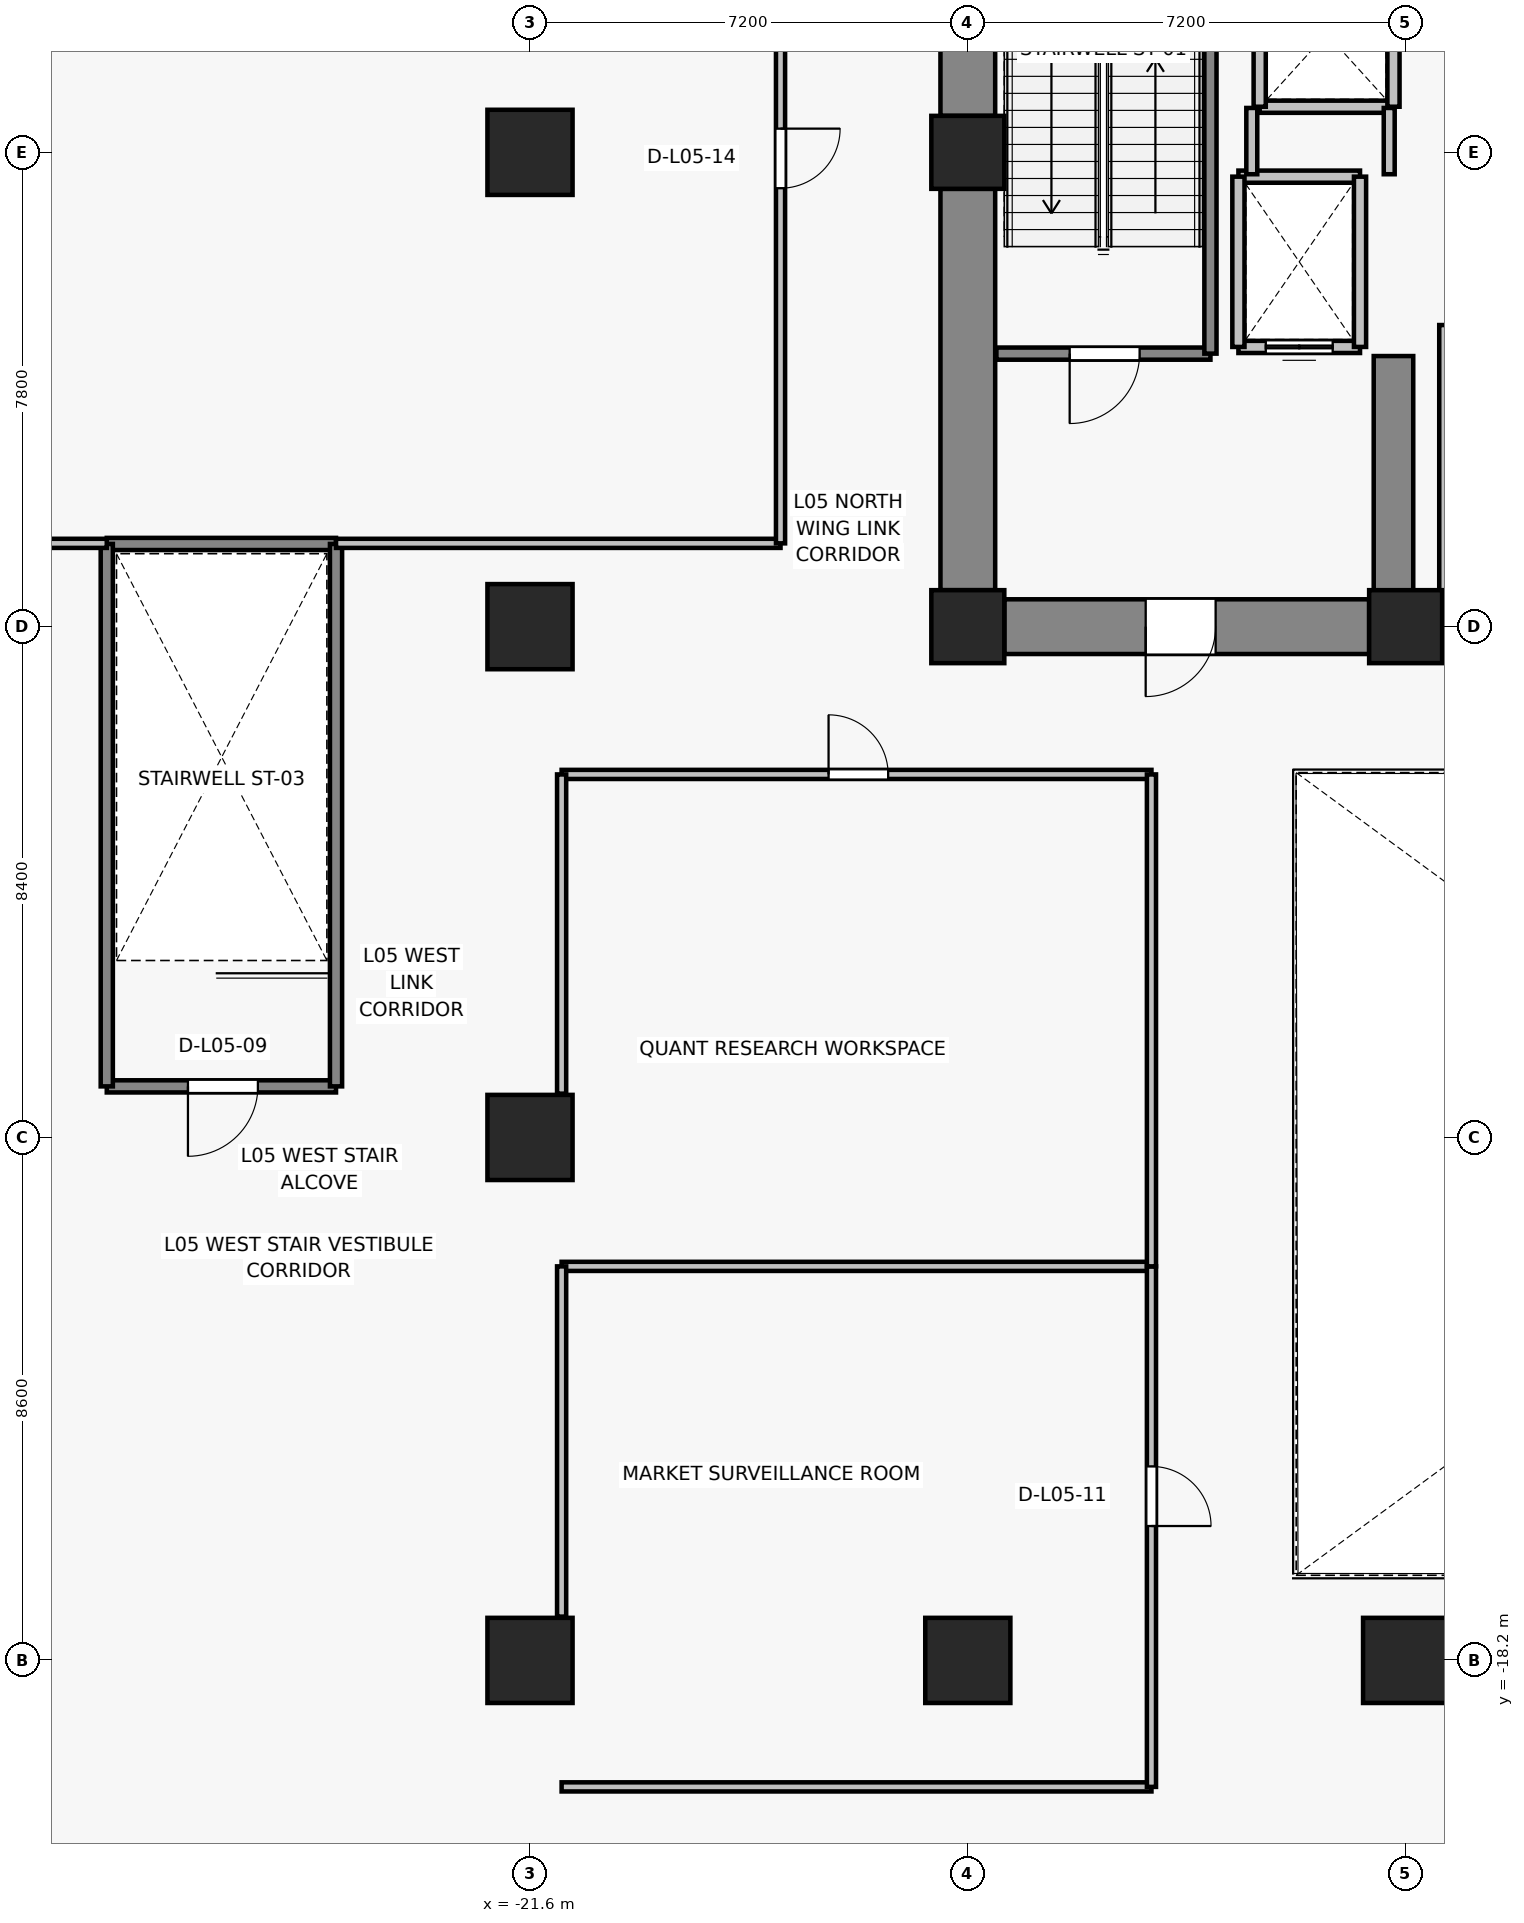
"""IFC4 building model, lengths in metres.
Left out: names, types, materials, properties, quantities, classifications, styles, units other than length and angle.
Written with IfcOpenShell. Run it as: python <this file> out.ifc"""

import sys

from ifc_helpers import new_model, si_unit, direction, frame, frame_2d, origin, origin_2d, place, context, subcontext, project, spatial, rectangle, extrude, source, transform, mapped, element, fill, save


model = new_model("IFC4")
c1 = context("Model", 3, precision=1e-05, world=origin(), true_north=direction((0.0, 1.0)))
c2 = subcontext(c1, "Body", "Model", "MODEL_VIEW")
j1 = project(units=[si_unit("LENGTHUNIT", "METRE"), si_unit("PLANEANGLEUNIT", "RADIAN")], contexts=[c1])
p1 = place(None, origin())
s1 = spatial("IfcSite", under=j1, at=p1, CompositionType="ELEMENT")
p2 = place(p1, origin())
s2 = spatial("IfcBuilding", under=s1, at=p2, CompositionType="ELEMENT")
p3 = place(p2, frame((0.0, 0.0, 22.6)))
s3 = spatial("IfcBuildingStorey", under=s2, at=p3, CompositionType="ELEMENT", Elevation=22.6)
for number, where, z_axis, x_axis in (
    (1, (-14.4, -1.2, 0.0), (0.0, 0.0, 1.0), (1.0, 0.0, 0.0)),
    (2, (-7.2, -1.2, 0.0), (0.0, 0.0, 1.0), (1.0, 0.0, 0.0)),
    (3, (-14.4, 6.6, 0.0), (0.0, 0.0, 1.0), (1.0, 0.0, 0.0)),
):
    element("IfcColumn", number, at=place(p3, frame(where, z_axis=z_axis, x_axis=x_axis)), inside=s3, PredefinedType="COLUMN", context=c2, shape_type="SweptSolid", body=[
        extrude(rectangle(XDim=1.2, YDim=1.2, at=origin_2d()), origin(), (0.0, 0.0, 1.0), 4.8),
    ])
for number, where, z_axis, x_axis in (
    (4, (-21.6, -18.2, 0.0), (0.0, 0.0, 1.0), (1.0, 0.0, 0.0)),
    (5, (-14.4, -18.2, 0.0), (0.0, 0.0, 1.0), (1.0, 0.0, 0.0)),
    (6, (-7.2, -18.2, 0.0), (0.0, 0.0, 1.0), (1.0, 0.0, 0.0)),
    (7, (-21.6, -9.6, 0.0), (0.0, 0.0, 1.0), (1.0, 0.0, 0.0)),
    (8, (-21.6, -1.2, 0.0), (0.0, 0.0, 1.0), (1.0, 0.0, 0.0)),
    (9, (-21.6, 6.6, 0.0), (0.0, 0.0, 1.0), (1.0, 0.0, 0.0)),
):
    element("IfcColumn", number, at=place(p3, frame(where, z_axis=z_axis, x_axis=x_axis)), inside=s3, PredefinedType="COLUMN", context=c2, shape_type="SweptSolid", body=[
        extrude(rectangle(XDim=1.4, YDim=1.4, at=origin_2d()), origin(), (0.0, 0.0, 1.0), 4.8),
    ])
p4 = place(p3, frame((-14.4, -0.6, 0.0), z_axis=(0.0, 0.0, 1.0), x_axis=(0.0, 1.0, 0.0)))
e10 = element("IfcWall", 10, at=p4, inside=s3, PredefinedType="SHEAR", context=c2, shape_type="SweptSolid", body=[
    extrude(rectangle(XDim=6.6, YDim=0.9, at=frame_2d((3.3, 0.0))), origin(), (0.0, 0.0, 1.0), 4.55),
])
p5 = place(p3, frame((-14.4, 7.2, 0.0), z_axis=(0.0, 0.0, 1.0), x_axis=(0.0, 1.0, 0.0)))
e11 = element("IfcWall", 11, at=p5, inside=s3, PredefinedType="SHEAR", context=c2, shape_type="SweptSolid", body=[
    extrude(rectangle(XDim=5.7, YDim=0.9, at=frame_2d((2.85, 0.0))), origin(), (0.0, 0.0, 1.0), 4.55),
])
p6 = place(p3, frame((-7.8, -1.2, 0.0), z_axis=(0.0, 0.0, 1.0), x_axis=(-1.0, 0.0, 0.0)))
e12 = element("IfcWall", 12, at=p6, inside=s3, PredefinedType="SHEAR", context=c2, shape_type="SweptSolid", body=[
    extrude(rectangle(XDim=6.0, YDim=0.9, at=frame_2d((3.0, 0.0))), origin(), (0.0, 0.0, 1.0), 4.55),
])
p7 = place(p6, frame((2.525, 0.0, 0.0)))
e13 = element("IfcOpeningElement", 13, at=p7, cuts=e12, PredefinedType="OPENING", context=c2, shape_type="SweptSolid", body=[
    extrude(rectangle(XDim=1.15, YDim=2.15, at=frame_2d((0.575, 1.075))), frame((0.0, 0.46, 0.0), z_axis=(0.0, -1.0, 0.0), x_axis=(1.0, 0.0, 0.0)), (0.0, 0.0, 1.0), 0.92),
])
p8 = place(p3, frame((-7.4, -0.75, 0.0), z_axis=(0.0, 0.0, 1.0), x_axis=(0.0, 1.0, 0.0)))
e14 = element("IfcWall", 14, at=p8, inside=s3, PredefinedType="SHEAR", context=c2, shape_type="SweptSolid", body=[
    extrude(rectangle(XDim=4.0, YDim=0.65, at=frame_2d((2.0, 0.0))), origin(), (0.0, 0.0, 1.0), 4.55),
])
p9 = place(p3, frame((-7.95, 3.4, 0.0), z_axis=(0.0, 0.0, 1.0), x_axis=(-1.0, 0.0, 0.0)))
e15 = element("IfcWall", 15, at=p9, inside=s3, PredefinedType="SOLIDWALL", context=c2, shape_type="SweptSolid", body=[
    extrude(rectangle(XDim=2.0, YDim=0.2, at=frame_2d((1.0, 0.0))), origin(), (0.0, 0.0, 1.0), 4.55),
])
p10 = place(p9, frame((0.45, 0.0, 0.0)))
e16 = element("IfcOpeningElement", 16, at=p10, cuts=e15, PredefinedType="OPENING", context=c2, shape_type="SweptSolid", body=[
    extrude(rectangle(XDim=1.1, YDim=2.2, at=frame_2d((0.55, 1.1))), frame((0.0, 0.11, 0.0), z_axis=(0.0, -1.0, 0.0), x_axis=(1.0, 0.0, 0.0)), (0.0, 0.0, 1.0), 0.22),
])
p11 = place(p3, frame((-9.95, 6.2, 0.0), z_axis=(0.0, 0.0, 1.0), x_axis=(1.0, 0.0, 0.0)))
e17 = element("IfcWall", 17, at=p11, inside=s3, PredefinedType="SOLIDWALL", context=c2, shape_type="SweptSolid", body=[
    extrude(rectangle(XDim=2.0, YDim=0.2, at=frame_2d((1.0, 0.0))), origin(), (0.0, 0.0, 1.0), 4.55),
])
for number, where, z_axis, x_axis in (
    (18, (-9.95, 3.4, 0.0), (0.0, 0.0, 1.0), (0.0, 1.0, 0.0)),
    (19, (-7.95, 6.2, 0.0), (0.0, 0.0, 1.0), (0.0, -1.0, 0.0)),
):
    element("IfcWall", number, at=place(p3, frame(where, z_axis=z_axis, x_axis=x_axis)), inside=s3, PredefinedType="SOLIDWALL", context=c2, shape_type="SweptSolid", body=[
        extrude(rectangle(XDim=2.8, YDim=0.2, at=frame_2d((1.4, 0.0))), origin(), (0.0, 0.0, 1.0), 4.55),
    ])
p12 = place(p3, frame((-7.4, 7.35, 0.0), z_axis=(0.0, 0.0, 1.0), x_axis=(-1.0, 0.0, 0.0)))
e20 = element("IfcWall", 20, at=p12, inside=s3, PredefinedType="SOLIDWALL", context=c2, shape_type="SweptSolid", body=[
    extrude(rectangle(XDim=2.2, YDim=0.2, at=frame_2d((1.1, 0.0))), origin(), (0.0, 0.0, 1.0), 3.09),
])
p13 = place(p3, frame((-9.6, 7.35, 0.0), z_axis=(0.0, 0.0, 1.0), x_axis=(0.0, 1.0, 0.0)))
e21 = element("IfcWall", 21, at=p13, inside=s3, PredefinedType="SOLIDWALL", context=c2, shape_type="SweptSolid", body=[
    extrude(rectangle(XDim=2.4, YDim=0.2, at=frame_2d((1.2, 0.0))), origin(), (0.0, 0.0, 1.0), 4.55),
])
p14 = place(p3, frame((-7.4, 9.75, 0.0), z_axis=(0.0, 0.0, 1.0), x_axis=(0.0, -1.0, 0.0)))
e22 = element("IfcWall", 22, at=p14, inside=s3, PredefinedType="SOLIDWALL", context=c2, shape_type="SweptSolid", body=[
    extrude(rectangle(XDim=2.4, YDim=0.2, at=frame_2d((1.2, 0.0))), origin(), (0.0, 0.0, 1.0), 3.09),
])
p15 = place(p3, frame((-10.41, 3.29, 0.0), z_axis=(0.0, 0.0, 1.0), x_axis=(-1.0, 0.0, 0.0)))
e23 = element("IfcWall", 23, at=p15, inside=s3, PredefinedType="SOLIDWALL", context=c2, shape_type="SweptSolid", body=[
    extrude(rectangle(XDim=3.52, YDim=0.2, at=frame_2d((1.76, 0.0))), origin(), (0.0, 0.0, 1.0), 4.55),
])
p16 = place(p15, frame((1.165, 0.0, 0.0)))
e24 = element("IfcOpeningElement", 24, at=p16, cuts=e23, PredefinedType="OPENING", context=c2, shape_type="SweptSolid", body=[
    extrude(rectangle(XDim=1.15, YDim=2.15, at=frame_2d((0.575, 1.075))), frame((0.0, 0.11, 0.0), z_axis=(0.0, -1.0, 0.0), x_axis=(1.0, 0.0, 0.0)), (0.0, 0.0, 1.0), 0.22),
])
p17 = place(p3, frame((-10.41, 12.13, 0.0), z_axis=(0.0, 0.0, 1.0), x_axis=(0.0, -1.0, 0.0)))
e25 = element("IfcWall", 25, at=p17, inside=s3, PredefinedType="SOLIDWALL", context=c2, shape_type="SweptSolid", body=[
    extrude(rectangle(XDim=8.84, YDim=0.2, at=frame_2d((4.42, 0.0))), origin(), (0.0, 0.0, 1.0), 4.55),
])
p18 = place(p3, frame((-9.73, 6.24, 0.0), z_axis=(0.0, 0.0, 1.0), x_axis=(0.0, 1.0, 0.0)))
e26 = element("IfcWall", 26, at=p18, inside=s3, PredefinedType="PARTITIONING", context=c2, shape_type="SweptSolid", body=[
    extrude(rectangle(XDim=1.09, YDim=0.18, at=frame_2d((0.545, 0.0))), origin(), (0.0, 0.0, 1.0), 4.55),
])
p19 = place(p3, frame((-7.47, 7.33, 0.0), z_axis=(0.0, 0.0, 1.0), x_axis=(0.0, -1.0, 0.0)))
e27 = element("IfcWall", 27, at=p19, inside=s3, PredefinedType="PARTITIONING", context=c2, shape_type="SweptSolid", body=[
    extrude(rectangle(XDim=1.09, YDim=0.18, at=frame_2d((0.545, 0.0))), origin(), (0.0, 0.0, 1.0), 3.09),
])
p20 = place(p3, frame((-1.47, -0.73, 0.0), z_axis=(0.0, 0.0, 1.0), x_axis=(-1.0, 0.0, 0.0)))
e28 = element("IfcWall", 28, at=p20, inside=s3, PredefinedType="PARTITIONING", context=c2, shape_type="SweptSolid", body=[
    extrude(rectangle(XDim=5.11, YDim=0.135, at=frame_2d((2.555, 0.0))), origin(), (0.0, 0.0, 1.0), 4.55),
])
p21 = place(p3, frame((-6.58, -0.73, 0.0), z_axis=(0.0, 0.0, 1.0), x_axis=(0.0, 1.0, 0.0)))
e29 = element("IfcWall", 29, at=p21, inside=s3, PredefinedType="PARTITIONING", context=c2, shape_type="SweptSolid", body=[
    extrude(rectangle(XDim=4.49, YDim=0.135, at=frame_2d((2.245, 0.0))), origin(), (0.0, 0.0, 1.0), 4.55),
])
p22 = place(p3, frame((-24.79, -8.76, 0.0), z_axis=(0.0, 0.0, 1.0), x_axis=(-1.0, 0.0, 0.0)))
e30 = element("IfcWall", 30, at=p22, inside=s3, PredefinedType="SOLIDWALL", context=c2, shape_type="SweptSolid", body=[
    extrude(rectangle(XDim=3.77, YDim=0.2, at=frame_2d((1.885, 0.0))), origin(), (0.0, 0.0, 1.0), 4.55),
])
p23 = place(p22, frame((1.285, 0.0, 0.0)))
e31 = element("IfcOpeningElement", 31, at=p23, cuts=e30, PredefinedType="OPENING", context=c2, shape_type="SweptSolid", body=[
    extrude(rectangle(XDim=1.15, YDim=2.15, at=frame_2d((0.575, 1.075))), frame((0.0, 0.11, 0.0), z_axis=(0.0, -1.0, 0.0), x_axis=(1.0, 0.0, 0.0)), (0.0, 0.0, 1.0), 0.22),
])
p24 = place(p3, frame((-28.56, 0.16, 0.0), z_axis=(0.0, 0.0, 1.0), x_axis=(1.0, 0.0, 0.0)))
e32 = element("IfcWall", 32, at=p24, inside=s3, PredefinedType="SOLIDWALL", context=c2, shape_type="SweptSolid", body=[
    extrude(rectangle(XDim=3.77, YDim=0.2, at=frame_2d((1.885, 0.0))), origin(), (0.0, 0.0, 1.0), 4.55),
])
for number, where, z_axis, x_axis in (
    (33, (-28.56, -8.76, 0.0), (0.0, 0.0, 1.0), (0.0, 1.0, 0.0)),
    (34, (-24.79, 0.16, 0.0), (0.0, 0.0, 1.0), (0.0, -1.0, 0.0)),
):
    element("IfcWall", number, at=place(p3, frame(where, z_axis=z_axis, x_axis=x_axis)), inside=s3, PredefinedType="SOLIDWALL", context=c2, shape_type="SweptSolid", body=[
        extrude(rectangle(XDim=8.92, YDim=0.2, at=frame_2d((4.46, 0.0))), origin(), (0.0, 0.0, 1.0), 3.09),
    ])
p25 = place(p3, frame((-11.38, -20.28, 0.0), z_axis=(0.0, 0.0, 1.0), x_axis=(-1.0, 0.0, 0.0)))
e35 = element("IfcWall", 35, at=p25, inside=s3, PredefinedType="PARTITIONING", context=c2, shape_type="SweptSolid", body=[
    extrude(rectangle(XDim=9.7, YDim=0.15, at=frame_2d((4.85, 0.0))), origin(), (0.0, 0.0, 1.0), 4.09),
])
p26 = place(p3, frame((-21.08, -11.72, 0.0), z_axis=(0.0, 0.0, 1.0), x_axis=(1.0, 0.0, 0.0)))
e36 = element("IfcWall", 36, at=p26, inside=s3, PredefinedType="PARTITIONING", context=c2, shape_type="SweptSolid", body=[
    extrude(rectangle(XDim=9.7, YDim=0.15, at=frame_2d((4.85, 0.0))), origin(), (0.0, 0.0, 1.0), 3.09),
])
p27 = place(p3, frame((-21.08, -17.48, 0.0), z_axis=(0.0, 0.0, 1.0), x_axis=(0.0, 1.0, 0.0)))
e37 = element("IfcWall", 37, at=p27, inside=s3, PredefinedType="PARTITIONING", context=c2, shape_type="SweptSolid", body=[
    extrude(rectangle(XDim=5.76, YDim=0.15, at=frame_2d((2.88, 0.0))), origin(), (0.0, 0.0, 1.0), 3.94),
])
p28 = place(p3, frame((-11.38, -11.72, 0.0), z_axis=(0.0, 0.0, 1.0), x_axis=(0.0, -1.0, 0.0)))
e38 = element("IfcWall", 38, at=p28, inside=s3, PredefinedType="PARTITIONING", context=c2, shape_type="SweptSolid", body=[
    extrude(rectangle(XDim=8.56, YDim=0.15, at=frame_2d((4.28, 0.0))), origin(), (0.0, 0.0, 1.0), 3.19),
])
p29 = place(p28, frame((3.29, 0.0, 0.0)))
e39 = element("IfcOpeningElement", 39, at=p29, cuts=e38, PredefinedType="OPENING", context=c2, shape_type="SweptSolid", body=[
    extrude(rectangle(XDim=0.98, YDim=2.15, at=frame_2d((0.49, 1.075))), frame((0.0, 0.085, 0.0), z_axis=(0.0, -1.0, 0.0), x_axis=(1.0, 0.0, 0.0)), (0.0, 0.0, 1.0), 0.17),
])
p30 = place(p3, frame((-21.08, -3.63, 0.0), z_axis=(0.0, 0.0, 1.0), x_axis=(1.0, 0.0, 0.0)))
e40 = element("IfcWall", 40, at=p30, inside=s3, PredefinedType="PARTITIONING", context=c2, shape_type="SweptSolid", body=[
    extrude(rectangle(XDim=9.7, YDim=0.15, at=frame_2d((4.85, 0.0))), origin(), (0.0, 0.0, 1.0), 3.09),
])
p31 = place(p30, frame((4.39, 0.0, 0.0)))
e41 = element("IfcOpeningElement", 41, at=p31, cuts=e40, PredefinedType="OPENING", context=c2, shape_type="SweptSolid", body=[
    extrude(rectangle(XDim=0.98, YDim=2.15, at=frame_2d((0.49, 1.075))), frame((0.0, 0.085, 0.0), z_axis=(0.0, -1.0, 0.0), x_axis=(1.0, 0.0, 0.0)), (0.0, 0.0, 1.0), 0.17),
])
p32 = place(p3, frame((-21.08, -8.88, 0.0), z_axis=(0.0, 0.0, 1.0), x_axis=(0.0, 1.0, 0.0)))
e42 = element("IfcWall", 42, at=p32, inside=s3, PredefinedType="PARTITIONING", context=c2, shape_type="SweptSolid", body=[
    extrude(rectangle(XDim=5.25, YDim=0.15, at=frame_2d((2.625, 0.0))), origin(), (0.0, 0.0, 1.0), 4.04),
])
p33 = place(p3, frame((-11.38, -3.63, 0.0), z_axis=(0.0, 0.0, 1.0), x_axis=(0.0, -1.0, 0.0)))
e43 = element("IfcWall", 43, at=p33, inside=s3, PredefinedType="PARTITIONING", context=c2, shape_type="SweptSolid", body=[
    extrude(rectangle(XDim=8.09, YDim=0.15, at=frame_2d((4.045, 0.0))), origin(), (0.0, 0.0, 1.0), 3.19),
])
p34 = place(p3, frame((-28.56, 0.17, 0.0), z_axis=(0.0, 0.0, 1.0), x_axis=(-1.0, 0.0, 0.0)))
e44 = element("IfcWall", 44, at=p34, inside=s3, PredefinedType="PARTITIONING", context=c2, shape_type="SweptSolid", body=[
    extrude(rectangle(XDim=5.32, YDim=0.15, at=frame_2d((2.66, 0.0))), origin(), (0.0, 0.0, 1.0), 3.09),
])
p35 = place(p3, frame((-17.48, 0.17, 0.0), z_axis=(0.0, 0.0, 1.0), x_axis=(-1.0, 0.0, 0.0)))
e45 = element("IfcWall", 45, at=p35, inside=s3, PredefinedType="PARTITIONING", context=c2, shape_type="SweptSolid", body=[
    extrude(rectangle(XDim=7.31, YDim=0.15, at=frame_2d((3.655, 0.0))), origin(), (0.0, 0.0, 1.0), 3.94),
])
p36 = place(p3, frame((-17.48, 13.48, 0.0), z_axis=(0.0, 0.0, 1.0), x_axis=(0.0, -1.0, 0.0)))
e46 = element("IfcWall", 46, at=p36, inside=s3, PredefinedType="PARTITIONING", context=c2, shape_type="SweptSolid", body=[
    extrude(rectangle(XDim=13.31, YDim=0.15, at=frame_2d((6.655, 0.0))), origin(), (0.0, 0.0, 1.0), 3.532),
])
p37 = place(p36, frame((6.49, 0.0, 0.0)))
e47 = element("IfcOpeningElement", 47, at=p37, cuts=e46, PredefinedType="OPENING", context=c2, shape_type="SweptSolid", body=[
    extrude(rectangle(XDim=0.98, YDim=2.15, at=frame_2d((0.49, 1.075))), frame((0.0, 0.085, 0.0), z_axis=(0.0, -1.0, 0.0), x_axis=(1.0, 0.0, 0.0)), (0.0, 0.0, 1.0), 0.17),
])
m1 = source(origin(), c2, "Body", "SweptSolid", [
    extrude(rectangle(XDim=1.1, YDim=2.2, at=frame_2d((0.55, 1.1))), frame((0.0, 0.025, 0.0), z_axis=(0.0, -1.0, 0.0), x_axis=(1.0, 0.0, 0.0)), (0.0, 0.0, 1.0), 0.05),
])
p38 = place(p10, origin())
e48 = element("IfcDoor", 48, at=p38, inside=s3, OperationType="DOUBLE_DOOR_SLIDING", PredefinedType="DOOR", context=c2, shape_type="MappedRepresentation", body=[
    mapped(m1, transform((0.0, 0.0, 0.0), x_axis=(1.0, 0.0, 0.0), y_axis=(0.0, 1.0, 0.0), z_axis=(0.0, 0.0, 1.0), scale=1.0)),
])
fill(e16, e48)
m2 = source(origin(), c2, "Body", "SweptSolid", [
    extrude(rectangle(XDim=1.15, YDim=2.15, at=frame_2d((0.575, 1.075))), frame((0.0, 0.025, 0.0), z_axis=(0.0, -1.0, 0.0), x_axis=(1.0, 0.0, 0.0)), (0.0, 0.0, 1.0), 0.05),
])
p39 = place(p16, origin())
e49 = element("IfcDoor", 49, at=p39, inside=s3, OperationType="SINGLE_SWING_RIGHT", PredefinedType="DOOR", context=c2, shape_type="MappedRepresentation", body=[
    mapped(m2, transform((0.0, 0.0, 0.0), x_axis=(1.0, 0.0, 0.0), y_axis=(0.0, 1.0, 0.0), z_axis=(0.0, 0.0, 1.0), scale=1.0)),
])
fill(e24, e49)
p40 = place(p7, origin())
e50 = element("IfcDoor", 50, at=p40, inside=s3, OperationType="SINGLE_SWING_RIGHT", PredefinedType="DOOR", context=c2, shape_type="MappedRepresentation", body=[
    mapped(m2, transform((0.0, 0.0, 0.0), x_axis=(1.0, 0.0, 0.0), y_axis=(0.0, 1.0, 0.0), z_axis=(0.0, 0.0, 1.0), scale=1.0)),
])
fill(e13, e50)
p41 = place(p23, origin())
e51 = element("IfcDoor", 51, at=p41, inside=s3, OperationType="SINGLE_SWING_RIGHT", PredefinedType="DOOR", context=c2, shape_type="MappedRepresentation", body=[
    mapped(m2, transform((0.0, 0.0, 0.0), x_axis=(1.0, 0.0, 0.0), y_axis=(0.0, 1.0, 0.0), z_axis=(0.0, 0.0, 1.0), scale=1.0)),
])
fill(e31, e51)
m3 = source(origin(), c2, "Body", "SweptSolid", [
    extrude(rectangle(XDim=0.98, YDim=2.15, at=frame_2d((0.49, 1.075))), frame((0.0, 0.025, 0.0), z_axis=(0.0, -1.0, 0.0), x_axis=(1.0, 0.0, 0.0)), (0.0, 0.0, 1.0), 0.05),
])
p42 = place(p29, origin())
e52 = element("IfcDoor", 52, at=p42, inside=s3, OperationType="SINGLE_SWING_RIGHT", PredefinedType="DOOR", context=c2, shape_type="MappedRepresentation", body=[
    mapped(m3, transform((0.0, 0.0, 0.0), x_axis=(1.0, 0.0, 0.0), y_axis=(0.0, 1.0, 0.0), z_axis=(0.0, 0.0, 1.0), scale=1.0)),
])
fill(e39, e52)
p43 = place(p31, origin())
e53 = element("IfcDoor", 53, at=p43, inside=s3, OperationType="SINGLE_SWING_LEFT", PredefinedType="DOOR", context=c2, shape_type="MappedRepresentation", body=[
    mapped(m3, transform((0.0, 0.0, 0.0), x_axis=(1.0, 0.0, 0.0), y_axis=(0.0, 1.0, 0.0), z_axis=(0.0, 0.0, 1.0), scale=1.0)),
])
fill(e41, e53)
p44 = place(p37, origin())
e54 = element("IfcDoor", 54, at=p44, inside=s3, OperationType="SINGLE_SWING_LEFT", PredefinedType="DOOR", context=c2, shape_type="MappedRepresentation", body=[
    mapped(m3, transform((0.0, 0.0, 0.0), x_axis=(1.0, 0.0, 0.0), y_axis=(0.0, 1.0, 0.0), z_axis=(0.0, 0.0, 1.0), scale=1.0)),
])
fill(e47, e54)
save(model, sys.argv[1])
